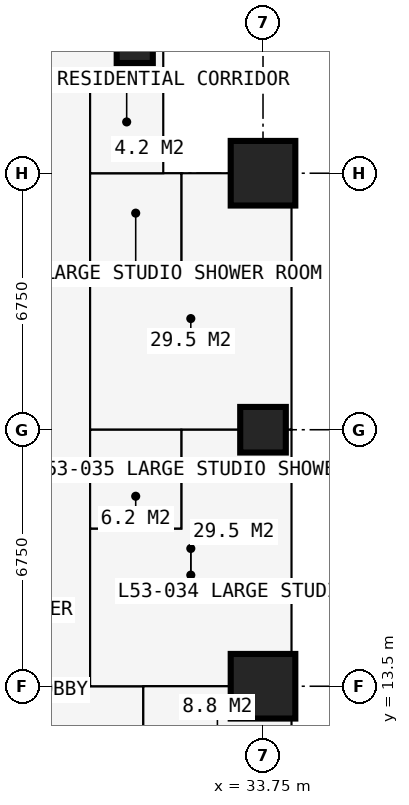
"""IFC4 building model, lengths in metres.
Left out: names, types, materials, properties, quantities, classifications, styles, units other than length and angle.
Written with IfcOpenShell. Run it as: python <this file> out.ifc"""

import sys

from ifc_helpers import new_model, si_unit, direction, frame, frame_2d, origin, origin_2d, place, context, subcontext, project, spatial, rectangle, extrude, element, fill, save


model = new_model("IFC4")
c1 = context("Model", 3, precision=1e-05, world=origin(), true_north=direction((0.0, 1.0)))
c2 = subcontext(c1, "Body", "Model", "MODEL_VIEW")
j1 = project(units=[si_unit("LENGTHUNIT", "METRE"), si_unit("PLANEANGLEUNIT", "RADIAN")], contexts=[c1])
p1 = place(None, origin())
s1 = spatial("IfcSite", under=j1, at=p1, CompositionType="ELEMENT")
p2 = place(p1, origin())
s2 = spatial("IfcBuilding", under=s1, at=p2, CompositionType="ELEMENT")
p3 = place(p2, frame((0.0, 0.0, 196.2)))
s3 = spatial("IfcBuildingStorey", under=s2, at=p3, CompositionType="ELEMENT", Elevation=196.2)
p4 = place(p3, frame((30.375, 30.375, 0.0), z_axis=(0.0, 0.0, 1.0), x_axis=(1.0, 0.0, 0.0)))
e1 = element("IfcColumn", 1, at=p4, inside=s3, PredefinedType="COLUMN", context=c2, shape_type="SweptSolid", body=[
    extrude(rectangle(XDim=0.95, YDim=0.95, at=origin_2d()), origin(), (0.0, 0.0, 1.0), 3.6),
])
p5 = place(p3, frame((33.75, 13.5, 0.0), z_axis=(0.0, 0.0, 1.0), x_axis=(1.0, 0.0, 0.0)))
e2 = element("IfcColumn", 2, at=p5, inside=s3, PredefinedType="COLUMN", context=c2, shape_type="SweptSolid", body=[
    extrude(rectangle(XDim=1.7, YDim=1.7, at=origin_2d()), origin(), (0.0, 0.0, 1.0), 3.6),
])
p6 = place(p3, frame((33.75, 20.25, 0.0), z_axis=(0.0, 0.0, 1.0), x_axis=(1.0, 0.0, 0.0)))
e3 = element("IfcColumn", 3, at=p6, inside=s3, PredefinedType="COLUMN", context=c2, shape_type="SweptSolid", body=[
    extrude(rectangle(XDim=1.2, YDim=1.2, at=origin_2d()), origin(), (0.0, 0.0, 1.0), 3.6),
])
p7 = place(p3, frame((33.75, 27.0, 0.0), z_axis=(0.0, 0.0, 1.0), x_axis=(1.0, 0.0, 0.0)))
e4 = element("IfcColumn", 4, at=p7, inside=s3, PredefinedType="COLUMN", context=c2, shape_type="SweptSolid", body=[
    extrude(rectangle(XDim=1.7, YDim=1.7, at=origin_2d()), origin(), (0.0, 0.0, 1.0), 3.6),
])
p8 = place(p3, frame((34.5, 27.75, 0.0), z_axis=(0.0, 0.0, 1.0), x_axis=(-1.0, 0.0, 0.0)))
e5 = element("IfcWall", 5, at=p8, inside=s3, PredefinedType="SOLIDWALL", context=c2, shape_type="SweptSolid", body=[
    extrude(rectangle(XDim=3.375, YDim=0.3, at=frame_2d((1.688, 0.0))), origin(), (0.0, 0.0, 1.0), 3.3),
])
p9 = place(p8, frame((1.657, 0.0, 0.9)))
e6 = element("IfcOpeningElement", 6, at=p9, cuts=e5, PredefinedType="OPENING", context=c2, shape_type="SweptSolid", body=[
    extrude(rectangle(XDim=1.5, YDim=1.8, at=frame_2d((0.75, 0.9))), frame((0.0, 0.16, 0.0), z_axis=(0.0, -1.0, 0.0), x_axis=(1.0, 0.0, 0.0)), (0.0, 0.0, 1.0), 0.32),
])
p10 = place(p3, frame((31.125, 27.75, 0.0), z_axis=(0.0, 0.0, 1.0), x_axis=(0.0, 1.0, 0.0)))
e7 = element("IfcWall", 7, at=p10, inside=s3, PredefinedType="SOLIDWALL", context=c2, shape_type="SweptSolid", body=[
    extrude(rectangle(XDim=3.375, YDim=0.3, at=frame_2d((1.688, 0.0))), origin(), (0.0, 0.0, 1.0), 3.3),
])
p11 = place(p10, frame((1.663, 0.0, 0.9)))
e8 = element("IfcOpeningElement", 8, at=p11, cuts=e7, PredefinedType="OPENING", context=c2, shape_type="SweptSolid", body=[
    extrude(rectangle(XDim=1.5, YDim=1.8, at=frame_2d((0.75, 0.9))), frame((0.0, 0.16, 0.0), z_axis=(0.0, -1.0, 0.0), x_axis=(1.0, 0.0, 0.0)), (0.0, 0.0, 1.0), 0.32),
])
p12 = place(p3, frame((11.3, 29.2, 0.0), z_axis=(0.0, 0.0, 1.0), x_axis=(1.0, 0.0, 0.0)))
e9 = element("IfcWall", 9, at=p12, inside=s3, PredefinedType="PARTITIONING", context=c2, shape_type="SweptSolid", body=[
    extrude(rectangle(XDim=19.809, YDim=0.15, at=frame_2d((9.904, 0.0))), origin(), (0.0, 0.0, 1.0), 3.3),
])
p13 = place(p12, frame((12.9, 0.0, 0.0)))
e10 = element("IfcOpeningElement", 10, at=p13, cuts=e9, PredefinedType="OPENING", context=c2, shape_type="SweptSolid", body=[
    extrude(rectangle(XDim=1.0, YDim=2.2, at=frame_2d((0.5, 1.1))), frame((0.0, 0.085, 0.0), z_axis=(0.0, -1.0, 0.0), x_axis=(1.0, 0.0, 0.0)), (0.0, 0.0, 1.0), 0.17),
])
p14 = place(p12, frame((6.4, 0.0, 0.0)))
e11 = element("IfcOpeningElement", 11, at=p14, cuts=e9, PredefinedType="OPENING", context=c2, shape_type="SweptSolid", body=[
    extrude(rectangle(XDim=0.95, YDim=2.2, at=frame_2d((0.475, 1.1))), frame((0.0, 0.085, 0.0), z_axis=(0.0, -1.0, 0.0), x_axis=(1.0, 0.0, 0.0)), (0.0, 0.0, 1.0), 0.17),
])
p15 = place(p12, frame((0.6, 0.0, 0.0)))
e12 = element("IfcOpeningElement", 12, at=p15, cuts=e9, PredefinedType="OPENING", context=c2, shape_type="SweptSolid", body=[
    extrude(rectangle(XDim=1.0, YDim=2.2, at=frame_2d((0.5, 1.1))), frame((0.0, 0.085, 0.0), z_axis=(0.0, -1.0, 0.0), x_axis=(1.0, 0.0, 0.0)), (0.0, 0.0, 1.0), 0.17),
])
p16 = place(p3, frame((29.2, 13.5, 0.0), z_axis=(0.0, 0.0, 1.0), x_axis=(0.0, 1.0, 0.0)))
e13 = element("IfcWall", 13, at=p16, inside=s3, PredefinedType="PARTITIONING", context=c2, shape_type="SweptSolid", body=[
    extrude(rectangle(XDim=15.7, YDim=0.2, at=frame_2d((7.85, 0.0))), origin(), (0.0, 0.0, 1.0), 3.3),
])
p17 = place(p16, frame((8.35, 0.0, 0.0)))
e14 = element("IfcOpeningElement", 14, at=p17, cuts=e13, PredefinedType="OPENING", context=c2, shape_type="SweptSolid", body=[
    extrude(rectangle(XDim=0.95, YDim=2.2, at=frame_2d((0.475, 1.1))), frame((0.0, 0.11, 0.0), z_axis=(0.0, -1.0, 0.0), x_axis=(1.0, 0.0, 0.0)), (0.0, 0.0, 1.0), 0.22),
])
p18 = place(p16, frame((1.6, 0.0, 0.0)))
e15 = element("IfcOpeningElement", 15, at=p18, cuts=e13, PredefinedType="OPENING", context=c2, shape_type="SweptSolid", body=[
    extrude(rectangle(XDim=0.95, YDim=2.2, at=frame_2d((0.475, 1.1))), frame((0.0, 0.11, 0.0), z_axis=(0.0, -1.0, 0.0), x_axis=(1.0, 0.0, 0.0)), (0.0, 0.0, 1.0), 0.22),
])
p19 = place(p16, frame((14.1, 0.0, 0.0)))
e16 = element("IfcOpeningElement", 16, at=p19, cuts=e13, PredefinedType="OPENING", context=c2, shape_type="SweptSolid", body=[
    extrude(rectangle(XDim=1.0, YDim=2.2, at=frame_2d((0.5, 1.1))), frame((0.0, 0.11, 0.0), z_axis=(0.0, -1.0, 0.0), x_axis=(1.0, 0.0, 0.0)), (0.0, 0.0, 1.0), 0.22),
])
p20 = place(p3, frame((29.2, 13.5, 0.0), z_axis=(0.0, 0.0, 1.0), x_axis=(1.0, 0.0, 0.0)))
e17 = element("IfcWall", 17, at=p20, inside=s3, PredefinedType="PARTITIONING", context=c2, shape_type="SweptSolid", body=[
    extrude(rectangle(XDim=5.284, YDim=0.175, at=frame_2d((2.642, 0.0))), origin(), (0.0, 0.0, 1.0), 2.802),
])
p21 = place(p3, frame((29.2, 17.65, 0.0), z_axis=(0.0, 0.0, 1.0), x_axis=(1.0, 0.0, 0.0)))
e18 = element("IfcWall", 18, at=p21, inside=s3, PredefinedType="PARTITIONING", context=c2, shape_type="SweptSolid", body=[
    extrude(rectangle(XDim=2.4, YDim=0.1, at=frame_2d((1.2, 0.0))), origin(), (0.0, 0.0, 1.0), 3.3),
])
p22 = place(p3, frame((29.2, 20.25, 0.0), z_axis=(0.0, 0.0, 1.0), x_axis=(1.0, 0.0, 0.0)))
e19 = element("IfcWall", 19, at=p22, inside=s3, PredefinedType="PARTITIONING", context=c2, shape_type="SweptSolid", body=[
    extrude(rectangle(XDim=5.284, YDim=0.175, at=frame_2d((2.642, 0.0))), origin(), (0.0, 0.0, 1.0), 2.802),
])
p23 = place(p22, frame((0.75, 0.0, 0.0)))
e20 = element("IfcOpeningElement", 20, at=p23, cuts=e19, PredefinedType="OPENING", context=c2, shape_type="SweptSolid", body=[
    extrude(rectangle(XDim=0.9, YDim=2.2, at=frame_2d((0.45, 1.1))), frame((0.0, 0.097, 0.0), z_axis=(0.0, -1.0, 0.0), x_axis=(1.0, 0.0, 0.0)), (0.0, 0.0, 1.0), 0.195),
])
p24 = place(p3, frame((29.2, 24.4, 0.0), z_axis=(0.0, 0.0, 1.0), x_axis=(1.0, 0.0, 0.0)))
e21 = element("IfcWall", 21, at=p24, inside=s3, PredefinedType="PARTITIONING", context=c2, shape_type="SweptSolid", body=[
    extrude(rectangle(XDim=2.4, YDim=0.1, at=frame_2d((1.2, 0.0))), origin(), (0.0, 0.0, 1.0), 3.3),
])
p25 = place(p3, frame((29.2, 27.0, 0.0), z_axis=(0.0, 0.0, 1.0), x_axis=(1.0, 0.0, 0.0)))
e22 = element("IfcWall", 22, at=p25, inside=s3, PredefinedType="PARTITIONING", context=c2, shape_type="SweptSolid", body=[
    extrude(rectangle(XDim=5.284, YDim=0.175, at=frame_2d((2.642, 0.0))), origin(), (0.0, 0.0, 1.0), 2.802),
])
p26 = place(p3, frame((30.6, 10.125, 0.0), z_axis=(0.0, 0.0, 1.0), x_axis=(0.0, 1.0, 0.0)))
e23 = element("IfcWall", 23, at=p26, inside=s3, PredefinedType="PARTITIONING", context=c2, shape_type="SweptSolid", body=[
    extrude(rectangle(XDim=3.375, YDim=0.1, at=frame_2d((1.688, 0.0))), origin(), (0.0, 0.0, 1.0), 3.3),
])
p27 = place(p26, frame((2.2, 0.0, 0.0)))
e24 = element("IfcOpeningElement", 24, at=p27, cuts=e23, PredefinedType="OPENING", context=c2, shape_type="SweptSolid", body=[
    extrude(rectangle(XDim=0.95, YDim=2.2, at=frame_2d((0.475, 1.1))), frame((0.0, 0.06, 0.0), z_axis=(0.0, -1.0, 0.0), x_axis=(1.0, 0.0, 0.0)), (0.0, 0.0, 1.0), 0.12),
])
p28 = place(p3, frame((31.125, 27.0, 0.0), z_axis=(0.0, 0.0, 1.0), x_axis=(0.0, 1.0, 0.0)))
e25 = element("IfcWall", 25, at=p28, inside=s3, PredefinedType="PARTITIONING", context=c2, shape_type="SweptSolid", body=[
    extrude(rectangle(XDim=0.734, YDim=0.15, at=frame_2d((0.367, 0.0))), origin(), (0.0, 0.0, 1.0), 3.3),
])
p29 = place(p3, frame((31.6, 17.65, 0.0), z_axis=(0.0, 0.0, 1.0), x_axis=(0.0, 1.0, 0.0)))
e26 = element("IfcWall", 26, at=p29, inside=s3, PredefinedType="PARTITIONING", context=c2, shape_type="SweptSolid", body=[
    extrude(rectangle(XDim=2.6, YDim=0.1, at=frame_2d((1.3, 0.0))), origin(), (0.0, 0.0, 1.0), 3.3),
])
p30 = place(p3, frame((31.6, 24.4, 0.0), z_axis=(0.0, 0.0, 1.0), x_axis=(0.0, 1.0, 0.0)))
e27 = element("IfcWall", 27, at=p30, inside=s3, PredefinedType="PARTITIONING", context=c2, shape_type="SweptSolid", body=[
    extrude(rectangle(XDim=2.6, YDim=0.1, at=frame_2d((1.3, 0.0))), origin(), (0.0, 0.0, 1.0), 3.3),
])
p31 = place(p30, frame((0.85, 0.0, 0.0)))
e28 = element("IfcOpeningElement", 28, at=p31, cuts=e27, PredefinedType="OPENING", context=c2, shape_type="SweptSolid", body=[
    extrude(rectangle(XDim=0.9, YDim=2.2, at=frame_2d((0.45, 1.1))), frame((0.0, 0.06, 0.0), z_axis=(0.0, -1.0, 0.0), x_axis=(1.0, 0.0, 0.0)), (0.0, 0.0, 1.0), 0.12),
])
p32 = place(p9, origin())
e29 = element("IfcWindow", 29, at=p32, inside=s3, PartitioningType="SINGLE_PANEL", PredefinedType="WINDOW", context=c2, shape_type="SweptSolid", body=[
    extrude(rectangle(XDim=1.5, YDim=1.8, at=frame_2d((0.75, 0.9))), frame((0.0, 0.03, 0.0), z_axis=(0.0, -1.0, 0.0), x_axis=(1.0, 0.0, 0.0)), (0.0, 0.0, 1.0), 0.06),
])
fill(e6, e29)
p33 = place(p11, origin())
e30 = element("IfcWindow", 30, at=p33, inside=s3, PartitioningType="SINGLE_PANEL", PredefinedType="WINDOW", context=c2, shape_type="SweptSolid", body=[
    extrude(rectangle(XDim=1.5, YDim=1.8, at=frame_2d((0.75, 0.9))), frame((0.0, 0.03, 0.0), z_axis=(0.0, -1.0, 0.0), x_axis=(1.0, 0.0, 0.0)), (0.0, 0.0, 1.0), 0.06),
])
fill(e8, e30)
p34 = place(p17, origin())
e31 = element("IfcDoor", 31, at=p34, inside=s3, OperationType="SINGLE_SWING_LEFT", PredefinedType="DOOR", context=c2, shape_type="SweptSolid", body=[
    extrude(rectangle(XDim=0.95, YDim=2.2, at=frame_2d((0.475, 1.1))), frame((0.0, 0.025, 0.0), z_axis=(0.0, -1.0, 0.0), x_axis=(1.0, 0.0, 0.0)), (0.0, 0.0, 1.0), 0.05),
])
fill(e14, e31)
p35 = place(p31, origin())
e32 = element("IfcDoor", 32, at=p35, inside=s3, OperationType="SINGLE_SWING_RIGHT", PredefinedType="DOOR", context=c2, shape_type="SweptSolid", body=[
    extrude(rectangle(XDim=0.9, YDim=2.2, at=frame_2d((0.45, 1.1))), frame((0.0, 0.025, 0.0), z_axis=(0.0, -1.0, 0.0), x_axis=(1.0, 0.0, 0.0)), (0.0, 0.0, 1.0), 0.05),
])
fill(e28, e32)
p36 = place(p18, origin())
e33 = element("IfcDoor", 33, at=p36, inside=s3, OperationType="SINGLE_SWING_LEFT", PredefinedType="DOOR", context=c2, shape_type="SweptSolid", body=[
    extrude(rectangle(XDim=0.95, YDim=2.2, at=frame_2d((0.475, 1.1))), frame((0.0, 0.025, 0.0), z_axis=(0.0, -1.0, 0.0), x_axis=(1.0, 0.0, 0.0)), (0.0, 0.0, 1.0), 0.05),
])
fill(e15, e33)
p37 = place(p23, origin())
e34 = element("IfcDoor", 34, at=p37, inside=s3, OperationType="SINGLE_SWING_RIGHT", PredefinedType="DOOR", context=c2, shape_type="SweptSolid", body=[
    extrude(rectangle(XDim=0.9, YDim=2.2, at=frame_2d((0.45, 1.1))), frame((0.0, 0.025, 0.0), z_axis=(0.0, -1.0, 0.0), x_axis=(1.0, 0.0, 0.0)), (0.0, 0.0, 1.0), 0.05),
])
fill(e20, e34)
p38 = place(p27, origin())
e35 = element("IfcDoor", 35, at=p38, inside=s3, OperationType="SINGLE_SWING_LEFT", PredefinedType="DOOR", context=c2, shape_type="SweptSolid", body=[
    extrude(rectangle(XDim=0.95, YDim=2.2, at=frame_2d((0.475, 1.1))), frame((0.0, 0.025, 0.0), z_axis=(0.0, -1.0, 0.0), x_axis=(1.0, 0.0, 0.0)), (0.0, 0.0, 1.0), 0.05),
])
fill(e24, e35)
p39 = place(p19, origin())
e36 = element("IfcDoor", 36, at=p39, inside=s3, OperationType="SINGLE_SWING_LEFT", PredefinedType="DOOR", context=c2, shape_type="SweptSolid", body=[
    extrude(rectangle(XDim=1.0, YDim=2.2, at=frame_2d((0.5, 1.1))), frame((0.0, 0.025, 0.0), z_axis=(0.0, -1.0, 0.0), x_axis=(1.0, 0.0, 0.0)), (0.0, 0.0, 1.0), 0.05),
])
fill(e16, e36)
save(model, sys.argv[1])
